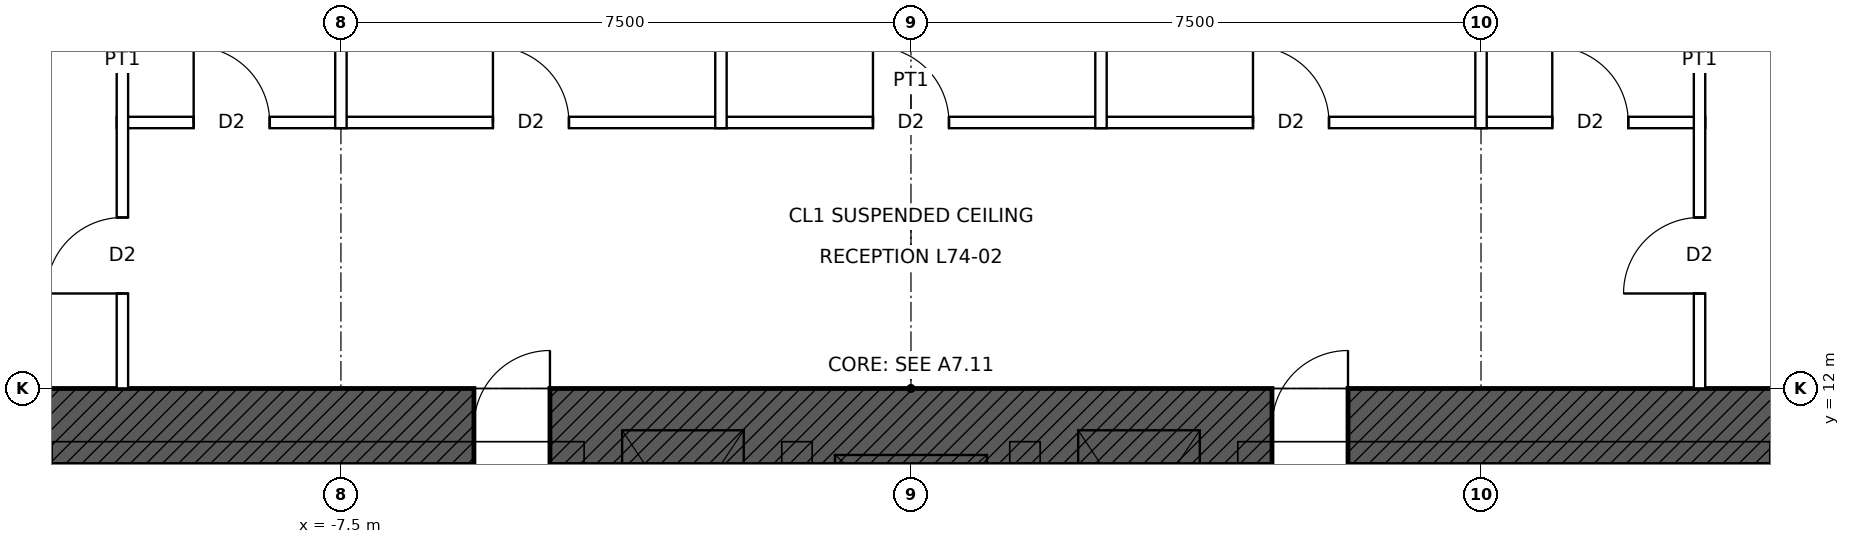
"""IFC4 building model, lengths in metres.
Left out: names, types, materials, properties, quantities, classifications, styles, units other than length and angle.
Written with IfcOpenShell. Run it as: python <this file> out.ifc"""

import sys

from ifc_helpers import new_model, si_unit, direction, frame, frame_2d, origin, place, context, subcontext, project, spatial, rectangle, extrude, element, fill, save


model = new_model("IFC4")
c1 = context("Model", 3, precision=1e-05, world=origin(), true_north=direction((0.0, 1.0)))
c2 = subcontext(c1, "Body", "Model", "MODEL_VIEW")
j1 = project(units=[si_unit("LENGTHUNIT", "METRE"), si_unit("PLANEANGLEUNIT", "RADIAN")], contexts=[c1])
p1 = place(None, origin())
s1 = spatial("IfcSite", under=j1, at=p1, CompositionType="ELEMENT")
p2 = place(p1, origin())
s2 = spatial("IfcBuilding", under=s1, at=p2, CompositionType="ELEMENT")
p3 = place(p2, frame((0.0, 0.0, 331.9)))
s3 = spatial("IfcBuildingStorey", under=s2, at=p3, CompositionType="ELEMENT", Elevation=331.9)
p4 = place(p3, frame((-12.0, 11.5, 0.0), z_axis=(0.0, 0.0, 1.0), x_axis=(1.0, 0.0, 0.0)))
e1 = element("IfcWall", 1, at=p4, inside=s3, PredefinedType="SHEAR", context=c2, shape_type="SweptSolid", body=[
    extrude(rectangle(XDim=24.0, YDim=1.0, at=frame_2d((12.0, 0.0))), origin(), (0.0, 0.0, 1.0), 4.0),
])
p5 = place(p4, frame((6.25, 0.0, 0.0)))
e2 = element("IfcOpeningElement", 2, at=p5, cuts=e1, PredefinedType="OPENING", context=c2, shape_type="SweptSolid", body=[
    extrude(rectangle(XDim=1.0, YDim=2.4, at=frame_2d((0.5, 1.2))), frame((0.0, 0.51, 0.0), z_axis=(0.0, -1.0, 0.0), x_axis=(1.0, 0.0, 0.0)), (0.0, 0.0, 1.0), 1.02),
])
p6 = place(p4, frame((16.75, 0.0, 0.0)))
e3 = element("IfcOpeningElement", 3, at=p6, cuts=e1, PredefinedType="OPENING", context=c2, shape_type="SweptSolid", body=[
    extrude(rectangle(XDim=1.0, YDim=2.4, at=frame_2d((0.5, 1.2))), frame((0.0, 0.51, 0.0), z_axis=(0.0, -1.0, 0.0), x_axis=(1.0, 0.0, 0.0)), (0.0, 0.0, 1.0), 1.02),
])
p7 = place(p3, frame((-10.45, 15.5, 0.0), z_axis=(0.0, 0.0, 1.0), x_axis=(1.0, 0.0, 0.0)))
e4 = element("IfcWall", 4, at=p7, inside=s3, PredefinedType="PARTITIONING", context=c2, shape_type="SweptSolid", body=[
    extrude(rectangle(XDim=20.9, YDim=0.15, at=frame_2d((10.45, 0.0))), origin(), (0.0, 0.0, 1.0), 3.8),
])
p8 = place(p7, frame((1.012, 0.0, 0.0)))
e5 = element("IfcOpeningElement", 5, at=p8, cuts=e4, PredefinedType="OPENING", context=c2, shape_type="SweptSolid", body=[
    extrude(rectangle(XDim=1.0, YDim=2.1, at=frame_2d((0.5, 1.05))), frame((0.0, 0.085, 0.0), z_axis=(0.0, -1.0, 0.0), x_axis=(1.0, 0.0, 0.0)), (0.0, 0.0, 1.0), 0.17),
])
p9 = place(p7, frame((4.95, 0.0, 0.0)))
e6 = element("IfcOpeningElement", 6, at=p9, cuts=e4, PredefinedType="OPENING", context=c2, shape_type="SweptSolid", body=[
    extrude(rectangle(XDim=1.0, YDim=2.1, at=frame_2d((0.5, 1.05))), frame((0.0, 0.085, 0.0), z_axis=(0.0, -1.0, 0.0), x_axis=(1.0, 0.0, 0.0)), (0.0, 0.0, 1.0), 0.17),
])
p10 = place(p7, frame((9.95, 0.0, 0.0)))
e7 = element("IfcOpeningElement", 7, at=p10, cuts=e4, PredefinedType="OPENING", context=c2, shape_type="SweptSolid", body=[
    extrude(rectangle(XDim=1.0, YDim=2.1, at=frame_2d((0.5, 1.05))), frame((0.0, 0.085, 0.0), z_axis=(0.0, -1.0, 0.0), x_axis=(1.0, 0.0, 0.0)), (0.0, 0.0, 1.0), 0.17),
])
p11 = place(p7, frame((14.95, 0.0, 0.0)))
e8 = element("IfcOpeningElement", 8, at=p11, cuts=e4, PredefinedType="OPENING", context=c2, shape_type="SweptSolid", body=[
    extrude(rectangle(XDim=1.0, YDim=2.1, at=frame_2d((0.5, 1.05))), frame((0.0, 0.085, 0.0), z_axis=(0.0, -1.0, 0.0), x_axis=(1.0, 0.0, 0.0)), (0.0, 0.0, 1.0), 0.17),
])
p12 = place(p7, frame((18.887, 0.0, 0.0)))
e9 = element("IfcOpeningElement", 9, at=p12, cuts=e4, PredefinedType="OPENING", context=c2, shape_type="SweptSolid", body=[
    extrude(rectangle(XDim=1.0, YDim=2.1, at=frame_2d((0.5, 1.05))), frame((0.0, 0.085, 0.0), z_axis=(0.0, -1.0, 0.0), x_axis=(1.0, 0.0, 0.0)), (0.0, 0.0, 1.0), 0.17),
])
p13 = place(p3, frame((-10.375, 12.0, 0.0), z_axis=(0.0, 0.0, 1.0), x_axis=(0.0, 1.0, 0.0)))
e10 = element("IfcWall", 10, at=p13, inside=s3, PredefinedType="PARTITIONING", context=c2, shape_type="SweptSolid", body=[
    extrude(rectangle(XDim=8.65, YDim=0.15, at=frame_2d((4.325, 0.0))), origin(), (0.0, 0.0, 1.0), 3.8),
])
p14 = place(p13, frame((1.25, 0.0, 0.0)))
e11 = element("IfcOpeningElement", 11, at=p14, cuts=e10, PredefinedType="OPENING", context=c2, shape_type="SweptSolid", body=[
    extrude(rectangle(XDim=1.0, YDim=2.1, at=frame_2d((0.5, 1.05))), frame((0.0, 0.085, 0.0), z_axis=(0.0, -1.0, 0.0), x_axis=(1.0, 0.0, 0.0)), (0.0, 0.0, 1.0), 0.17),
])
p15 = place(p3, frame((-7.5, 15.425, 0.0), z_axis=(0.0, 0.0, 1.0), x_axis=(0.0, 1.0, 0.0)))
e12 = element("IfcWall", 12, at=p15, inside=s3, PredefinedType="PARTITIONING", context=c2, shape_type="SweptSolid", body=[
    extrude(rectangle(XDim=4.115, YDim=0.15, at=frame_2d((2.058, 0.0))), origin(), (0.0, 0.0, 1.0), 2.769),
])
for number, where, z_axis, x_axis in (
    (13, (-2.5, 15.425, 0.0), (0.0, 0.0, 1.0), (0.0, 1.0, 0.0)),
    (14, (2.5, 15.425, 0.0), (0.0, 0.0, 1.0), (0.0, 1.0, 0.0)),
):
    element("IfcWall", number, at=place(p3, frame(where, z_axis=z_axis, x_axis=x_axis)), inside=s3, PredefinedType="PARTITIONING", context=c2, shape_type="SweptSolid", body=[
        extrude(rectangle(XDim=5.225, YDim=0.15, at=frame_2d((2.612, 0.0))), origin(), (0.0, 0.0, 1.0), 3.8),
    ])
p16 = place(p3, frame((7.5, 15.425, 0.0), z_axis=(0.0, 0.0, 1.0), x_axis=(0.0, 1.0, 0.0)))
e15 = element("IfcWall", 15, at=p16, inside=s3, PredefinedType="PARTITIONING", context=c2, shape_type="SweptSolid", body=[
    extrude(rectangle(XDim=4.115, YDim=0.15, at=frame_2d((2.058, 0.0))), origin(), (0.0, 0.0, 1.0), 2.769),
])
p17 = place(p3, frame((10.375, 12.0, 0.0), z_axis=(0.0, 0.0, 1.0), x_axis=(0.0, 1.0, 0.0)))
e16 = element("IfcWall", 16, at=p17, inside=s3, PredefinedType="PARTITIONING", context=c2, shape_type="SweptSolid", body=[
    extrude(rectangle(XDim=8.65, YDim=0.15, at=frame_2d((4.325, 0.0))), origin(), (0.0, 0.0, 1.0), 3.8),
])
p18 = place(p17, frame((1.25, 0.0, 0.0)))
e17 = element("IfcOpeningElement", 17, at=p18, cuts=e16, PredefinedType="OPENING", context=c2, shape_type="SweptSolid", body=[
    extrude(rectangle(XDim=1.0, YDim=2.1, at=frame_2d((0.5, 1.05))), frame((0.0, 0.085, 0.0), z_axis=(0.0, -1.0, 0.0), x_axis=(1.0, 0.0, 0.0)), (0.0, 0.0, 1.0), 0.17),
])
p19 = place(p5, origin())
e18 = element("IfcDoor", 18, at=p19, inside=s3, OperationType="SINGLE_SWING_RIGHT", PredefinedType="DOOR", context=c2, shape_type="SweptSolid", body=[
    extrude(rectangle(XDim=1.0, YDim=2.4, at=frame_2d((0.5, 1.2))), frame((0.0, 0.485, 0.0), z_axis=(0.0, -1.0, 0.0), x_axis=(1.0, 0.0, 0.0)), (0.0, 0.0, 1.0), 0.05),
])
fill(e2, e18)
p20 = place(p6, origin())
e19 = element("IfcDoor", 19, at=p20, inside=s3, OperationType="SINGLE_SWING_RIGHT", PredefinedType="DOOR", context=c2, shape_type="SweptSolid", body=[
    extrude(rectangle(XDim=1.0, YDim=2.4, at=frame_2d((0.5, 1.2))), frame((0.0, 0.485, 0.0), z_axis=(0.0, -1.0, 0.0), x_axis=(1.0, 0.0, 0.0)), (0.0, 0.0, 1.0), 0.05),
])
fill(e3, e19)
p21 = place(p8, origin())
e20 = element("IfcDoor", 20, at=p21, inside=s3, OperationType="SINGLE_SWING_LEFT", PredefinedType="DOOR", context=c2, shape_type="SweptSolid", body=[
    extrude(rectangle(XDim=1.0, YDim=2.1, at=frame_2d((0.5, 1.05))), frame((0.0, 0.025, 0.0), z_axis=(0.0, -1.0, 0.0), x_axis=(1.0, 0.0, 0.0)), (0.0, 0.0, 1.0), 0.05),
])
fill(e5, e20)
p22 = place(p9, origin())
e21 = element("IfcDoor", 21, at=p22, inside=s3, OperationType="SINGLE_SWING_LEFT", PredefinedType="DOOR", context=c2, shape_type="SweptSolid", body=[
    extrude(rectangle(XDim=1.0, YDim=2.1, at=frame_2d((0.5, 1.05))), frame((0.0, 0.025, 0.0), z_axis=(0.0, -1.0, 0.0), x_axis=(1.0, 0.0, 0.0)), (0.0, 0.0, 1.0), 0.05),
])
fill(e6, e21)
p23 = place(p10, origin())
e22 = element("IfcDoor", 22, at=p23, inside=s3, OperationType="SINGLE_SWING_LEFT", PredefinedType="DOOR", context=c2, shape_type="SweptSolid", body=[
    extrude(rectangle(XDim=1.0, YDim=2.1, at=frame_2d((0.5, 1.05))), frame((0.0, 0.025, 0.0), z_axis=(0.0, -1.0, 0.0), x_axis=(1.0, 0.0, 0.0)), (0.0, 0.0, 1.0), 0.05),
])
fill(e7, e22)
p24 = place(p11, origin())
e23 = element("IfcDoor", 23, at=p24, inside=s3, OperationType="SINGLE_SWING_LEFT", PredefinedType="DOOR", context=c2, shape_type="SweptSolid", body=[
    extrude(rectangle(XDim=1.0, YDim=2.1, at=frame_2d((0.5, 1.05))), frame((0.0, 0.025, 0.0), z_axis=(0.0, -1.0, 0.0), x_axis=(1.0, 0.0, 0.0)), (0.0, 0.0, 1.0), 0.05),
])
fill(e8, e23)
p25 = place(p12, origin())
e24 = element("IfcDoor", 24, at=p25, inside=s3, OperationType="SINGLE_SWING_LEFT", PredefinedType="DOOR", context=c2, shape_type="SweptSolid", body=[
    extrude(rectangle(XDim=1.0, YDim=2.1, at=frame_2d((0.5, 1.05))), frame((0.0, 0.025, 0.0), z_axis=(0.0, -1.0, 0.0), x_axis=(1.0, 0.0, 0.0)), (0.0, 0.0, 1.0), 0.05),
])
fill(e9, e24)
p26 = place(p18, origin())
e25 = element("IfcDoor", 25, at=p26, inside=s3, OperationType="SINGLE_SWING_LEFT", PredefinedType="DOOR", context=c2, shape_type="SweptSolid", body=[
    extrude(rectangle(XDim=1.0, YDim=2.1, at=frame_2d((0.5, 1.05))), frame((0.0, 0.025, 0.0), z_axis=(0.0, -1.0, 0.0), x_axis=(1.0, 0.0, 0.0)), (0.0, 0.0, 1.0), 0.05),
])
fill(e17, e25)
p27 = place(p14, origin())
e26 = element("IfcDoor", 26, at=p27, inside=s3, OperationType="SINGLE_SWING_LEFT", PredefinedType="DOOR", context=c2, shape_type="SweptSolid", body=[
    extrude(rectangle(XDim=1.0, YDim=2.1, at=frame_2d((0.5, 1.05))), frame((0.0, 0.025, 0.0), z_axis=(0.0, -1.0, 0.0), x_axis=(1.0, 0.0, 0.0)), (0.0, 0.0, 1.0), 0.05),
])
fill(e11, e26)
save(model, sys.argv[1])
